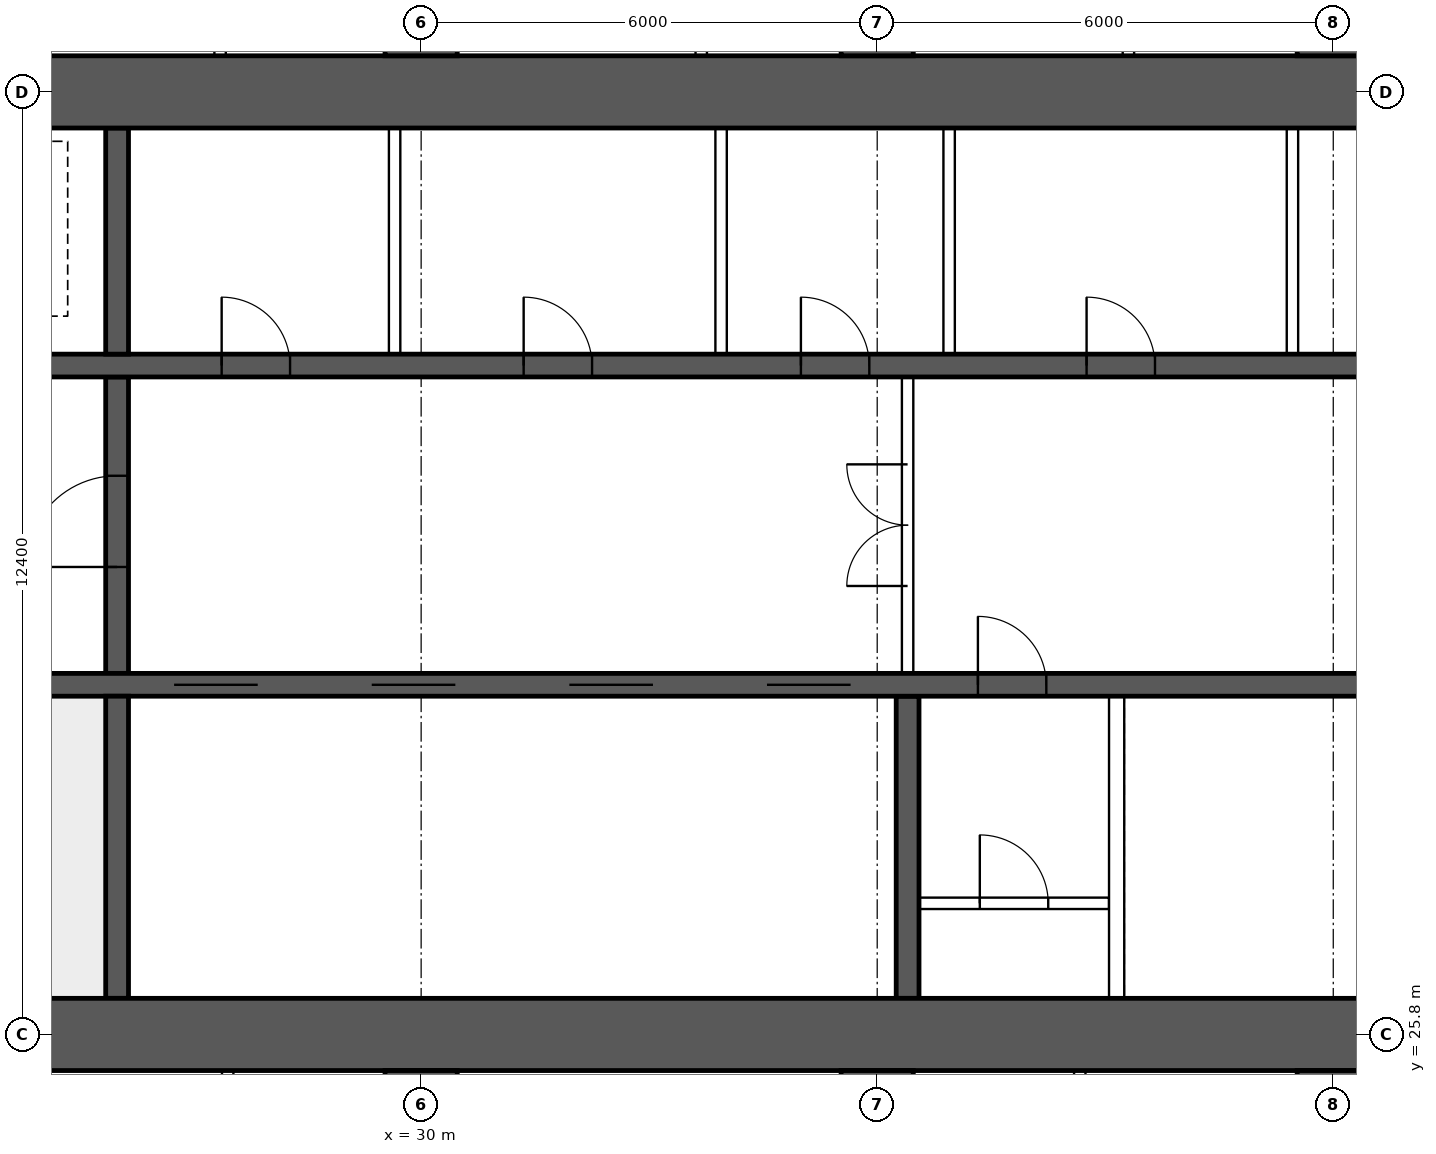
"""IFC4 building model, lengths in metres.
Left out: names, types, materials, properties, quantities, classifications, styles, units other than length and angle.
Written with IfcOpenShell. Run it as: python <this file> out.ifc"""

import sys

from ifc_helpers import new_model, si_unit, direction, frame, frame_2d, origin, place, context, subcontext, project, spatial, rectangle, extrude, element, fill, save


model = new_model("IFC4")
c1 = context("Model", 3, precision=1e-05, world=origin(), true_north=direction((0.0, 1.0)))
c2 = subcontext(c1, "Body", "Model", "MODEL_VIEW")
j1 = project(units=[si_unit("LENGTHUNIT", "METRE"), si_unit("PLANEANGLEUNIT", "RADIAN")], contexts=[c1])
p1 = place(None, origin())
s1 = spatial("IfcSite", under=j1, at=p1, CompositionType="ELEMENT")
p2 = place(p1, origin())
s2 = spatial("IfcBuilding", under=s1, at=p2, CompositionType="ELEMENT")
p3 = place(p2, frame((0.0, 0.0, 114.4)))
s3 = spatial("IfcBuildingStorey", under=s2, at=p3, CompositionType="ELEMENT", Elevation=114.4)
for number, where, z_axis, x_axis in (
    (1, (18.0, 25.8, 0.0), (0.0, 0.0, 1.0), (1.0, 0.0, 0.0)),
    (2, (18.0, 38.2, 0.0), (0.0, 0.0, 1.0), (1.0, 0.0, 0.0)),
):
    element("IfcWall", number, at=place(p3, frame(where, z_axis=z_axis, x_axis=x_axis)), inside=s3, PredefinedType="SHEAR", context=c2, shape_type="SweptSolid", body=[
        extrude(rectangle(XDim=48.0, YDim=0.95, at=frame_2d((24.0, 0.0))), origin(), (0.0, 0.0, 1.0), 3.75),
    ])
p4 = place(p3, frame((18.475, 30.4, 0.0), z_axis=(0.0, 0.0, 1.0), x_axis=(1.0, 0.0, 0.0)))
e3 = element("IfcWall", 3, at=p4, inside=s3, PredefinedType="SHEAR", context=c2, shape_type="SweptSolid", body=[
    extrude(rectangle(XDim=47.05, YDim=0.3, at=frame_2d((23.525, 0.0))), origin(), (0.0, 0.0, 1.0), 3.75),
])
p5 = place(p4, frame((0.4, 0.0, 0.0)))
e4 = element("IfcOpeningElement", 4, at=p5, cuts=e3, PredefinedType="OPENING", context=c2, shape_type="SweptSolid", body=[
    extrude(rectangle(XDim=1.0, YDim=2.1, at=frame_2d((0.5, 1.05))), frame((0.0, 0.16, 0.0), z_axis=(0.0, -1.0, 0.0), x_axis=(1.0, 0.0, 0.0)), (0.0, 0.0, 1.0), 0.32),
])
p6 = place(p4, frame((45.65, 0.0, 0.0)))
e5 = element("IfcOpeningElement", 5, at=p6, cuts=e3, PredefinedType="OPENING", context=c2, shape_type="SweptSolid", body=[
    extrude(rectangle(XDim=1.0, YDim=2.1, at=frame_2d((0.5, 1.05))), frame((0.0, 0.16, 0.0), z_axis=(0.0, -1.0, 0.0), x_axis=(1.0, 0.0, 0.0)), (0.0, 0.0, 1.0), 0.32),
])
p7 = place(p4, frame((8.275, 0.0, 0.0)))
e6 = element("IfcOpeningElement", 6, at=p7, cuts=e3, PredefinedType="OPENING", context=c2, shape_type="SweptSolid", body=[
    extrude(rectangle(XDim=1.1, YDim=2.1, at=frame_2d((0.55, 1.05))), frame((0.0, 0.16, 0.0), z_axis=(0.0, -1.0, 0.0), x_axis=(1.0, 0.0, 0.0)), (0.0, 0.0, 1.0), 0.32),
])
p8 = place(p4, frame((10.875, 0.0, 0.0)))
e7 = element("IfcOpeningElement", 7, at=p8, cuts=e3, PredefinedType="OPENING", context=c2, shape_type="SweptSolid", body=[
    extrude(rectangle(XDim=1.1, YDim=2.1, at=frame_2d((0.55, 1.05))), frame((0.0, 0.16, 0.0), z_axis=(0.0, -1.0, 0.0), x_axis=(1.0, 0.0, 0.0)), (0.0, 0.0, 1.0), 0.32),
])
p9 = place(p4, frame((13.475, 0.0, 0.0)))
e8 = element("IfcOpeningElement", 8, at=p9, cuts=e3, PredefinedType="OPENING", context=c2, shape_type="SweptSolid", body=[
    extrude(rectangle(XDim=1.1, YDim=2.1, at=frame_2d((0.55, 1.05))), frame((0.0, 0.16, 0.0), z_axis=(0.0, -1.0, 0.0), x_axis=(1.0, 0.0, 0.0)), (0.0, 0.0, 1.0), 0.32),
])
p10 = place(p4, frame((16.075, 0.0, 0.0)))
e9 = element("IfcOpeningElement", 9, at=p10, cuts=e3, PredefinedType="OPENING", context=c2, shape_type="SweptSolid", body=[
    extrude(rectangle(XDim=1.1, YDim=2.1, at=frame_2d((0.55, 1.05))), frame((0.0, 0.16, 0.0), z_axis=(0.0, -1.0, 0.0), x_axis=(1.0, 0.0, 0.0)), (0.0, 0.0, 1.0), 0.32),
])
p11 = place(p4, frame((18.85, 0.0, 0.0)))
e10 = element("IfcOpeningElement", 10, at=p11, cuts=e3, PredefinedType="OPENING", context=c2, shape_type="SweptSolid", body=[
    extrude(rectangle(XDim=0.9, YDim=2.1, at=frame_2d((0.45, 1.05))), frame((0.0, 0.16, 0.0), z_axis=(0.0, -1.0, 0.0), x_axis=(1.0, 0.0, 0.0)), (0.0, 0.0, 1.0), 0.32),
])
p12 = place(p4, frame((30.142, 0.0, 0.0)))
e11 = element("IfcOpeningElement", 11, at=p12, cuts=e3, PredefinedType="OPENING", context=c2, shape_type="SweptSolid", body=[
    extrude(rectangle(XDim=1.1, YDim=2.1, at=frame_2d((0.55, 1.05))), frame((0.0, 0.16, 0.0), z_axis=(0.0, -1.0, 0.0), x_axis=(1.0, 0.0, 0.0)), (0.0, 0.0, 1.0), 0.32),
])
p13 = place(p4, frame((33.675, 0.0, 0.0)))
e12 = element("IfcOpeningElement", 12, at=p13, cuts=e3, PredefinedType="OPENING", context=c2, shape_type="SweptSolid", body=[
    extrude(rectangle(XDim=1.1, YDim=2.1, at=frame_2d((0.55, 1.05))), frame((0.0, 0.16, 0.0), z_axis=(0.0, -1.0, 0.0), x_axis=(1.0, 0.0, 0.0)), (0.0, 0.0, 1.0), 0.32),
])
p14 = place(p4, frame((37.208, 0.0, 0.0)))
e13 = element("IfcOpeningElement", 13, at=p14, cuts=e3, PredefinedType="OPENING", context=c2, shape_type="SweptSolid", body=[
    extrude(rectangle(XDim=1.1, YDim=2.1, at=frame_2d((0.55, 1.05))), frame((0.0, 0.16, 0.0), z_axis=(0.0, -1.0, 0.0), x_axis=(1.0, 0.0, 0.0)), (0.0, 0.0, 1.0), 0.32),
])
p15 = place(p3, frame((18.475, 34.6, 0.0), z_axis=(0.0, 0.0, 1.0), x_axis=(1.0, 0.0, 0.0)))
e14 = element("IfcWall", 14, at=p15, inside=s3, PredefinedType="SHEAR", context=c2, shape_type="SweptSolid", body=[
    extrude(rectangle(XDim=47.05, YDim=0.3, at=frame_2d((23.525, 0.0))), origin(), (0.0, 0.0, 1.0), 3.75),
])
p16 = place(p15, frame((0.9, 0.0, 0.0)))
e15 = element("IfcOpeningElement", 15, at=p16, cuts=e14, PredefinedType="OPENING", context=c2, shape_type="SweptSolid", body=[
    extrude(rectangle(XDim=1.1, YDim=2.1, at=frame_2d((0.55, 1.05))), frame((0.0, 0.16, 0.0), z_axis=(0.0, -1.0, 0.0), x_axis=(1.0, 0.0, 0.0)), (0.0, 0.0, 1.0), 0.32),
])
p17 = place(p15, frame((45.05, 0.0, 0.0)))
e16 = element("IfcOpeningElement", 16, at=p17, cuts=e14, PredefinedType="OPENING", context=c2, shape_type="SweptSolid", body=[
    extrude(rectangle(XDim=1.1, YDim=2.1, at=frame_2d((0.55, 1.05))), frame((0.0, 0.16, 0.0), z_axis=(0.0, -1.0, 0.0), x_axis=(1.0, 0.0, 0.0)), (0.0, 0.0, 1.0), 0.32),
])
p18 = place(p15, frame((4.125, 0.0, 0.0)))
e17 = element("IfcOpeningElement", 17, at=p18, cuts=e14, PredefinedType="OPENING", context=c2, shape_type="SweptSolid", body=[
    extrude(rectangle(XDim=0.9, YDim=2.1, at=frame_2d((0.45, 1.05))), frame((0.0, 0.16, 0.0), z_axis=(0.0, -1.0, 0.0), x_axis=(1.0, 0.0, 0.0)), (0.0, 0.0, 1.0), 0.32),
])
p19 = place(p15, frame((42.025, 0.0, 0.0)))
e18 = element("IfcOpeningElement", 18, at=p19, cuts=e14, PredefinedType="OPENING", context=c2, shape_type="SweptSolid", body=[
    extrude(rectangle(XDim=0.9, YDim=2.1, at=frame_2d((0.45, 1.05))), frame((0.0, 0.16, 0.0), z_axis=(0.0, -1.0, 0.0), x_axis=(1.0, 0.0, 0.0)), (0.0, 0.0, 1.0), 0.32),
])
p20 = place(p15, frame((8.9, 0.0, 0.0)))
e19 = element("IfcOpeningElement", 19, at=p20, cuts=e14, PredefinedType="OPENING", context=c2, shape_type="SweptSolid", body=[
    extrude(rectangle(XDim=0.9, YDim=2.1, at=frame_2d((0.45, 1.05))), frame((0.0, 0.16, 0.0), z_axis=(0.0, -1.0, 0.0), x_axis=(1.0, 0.0, 0.0)), (0.0, 0.0, 1.0), 0.32),
])
p21 = place(p15, frame((12.874, 0.0, 0.0)))
e20 = element("IfcOpeningElement", 20, at=p21, cuts=e14, PredefinedType="OPENING", context=c2, shape_type="SweptSolid", body=[
    extrude(rectangle(XDim=0.9, YDim=2.1, at=frame_2d((0.45, 1.05))), frame((0.0, 0.16, 0.0), z_axis=(0.0, -1.0, 0.0), x_axis=(1.0, 0.0, 0.0)), (0.0, 0.0, 1.0), 0.32),
])
p22 = place(p15, frame((16.521, 0.0, 0.0)))
e21 = element("IfcOpeningElement", 21, at=p22, cuts=e14, PredefinedType="OPENING", context=c2, shape_type="SweptSolid", body=[
    extrude(rectangle(XDim=0.9, YDim=2.1, at=frame_2d((0.45, 1.05))), frame((0.0, 0.16, 0.0), z_axis=(0.0, -1.0, 0.0), x_axis=(1.0, 0.0, 0.0)), (0.0, 0.0, 1.0), 0.32),
])
p23 = place(p15, frame((20.28, 0.0, 0.0)))
e22 = element("IfcOpeningElement", 22, at=p23, cuts=e14, PredefinedType="OPENING", context=c2, shape_type="SweptSolid", body=[
    extrude(rectangle(XDim=0.9, YDim=2.1, at=frame_2d((0.45, 1.05))), frame((0.0, 0.16, 0.0), z_axis=(0.0, -1.0, 0.0), x_axis=(1.0, 0.0, 0.0)), (0.0, 0.0, 1.0), 0.32),
])
p24 = place(p15, frame((24.686, 0.0, 0.0)))
e23 = element("IfcOpeningElement", 23, at=p24, cuts=e14, PredefinedType="OPENING", context=c2, shape_type="SweptSolid", body=[
    extrude(rectangle(XDim=0.9, YDim=2.1, at=frame_2d((0.45, 1.05))), frame((0.0, 0.16, 0.0), z_axis=(0.0, -1.0, 0.0), x_axis=(1.0, 0.0, 0.0)), (0.0, 0.0, 1.0), 0.32),
])
p25 = place(p15, frame((27.483, 0.0, 0.0)))
e24 = element("IfcOpeningElement", 24, at=p25, cuts=e14, PredefinedType="OPENING", context=c2, shape_type="SweptSolid", body=[
    extrude(rectangle(XDim=0.9, YDim=2.1, at=frame_2d((0.45, 1.05))), frame((0.0, 0.16, 0.0), z_axis=(0.0, -1.0, 0.0), x_axis=(1.0, 0.0, 0.0)), (0.0, 0.0, 1.0), 0.32),
])
p26 = place(p15, frame((29.856, 0.0, 0.0)))
e25 = element("IfcOpeningElement", 25, at=p26, cuts=e14, PredefinedType="OPENING", context=c2, shape_type="SweptSolid", body=[
    extrude(rectangle(XDim=0.9, YDim=2.1, at=frame_2d((0.45, 1.05))), frame((0.0, 0.16, 0.0), z_axis=(0.0, -1.0, 0.0), x_axis=(1.0, 0.0, 0.0)), (0.0, 0.0, 1.0), 0.32),
])
p27 = place(p15, frame((33.706, 0.0, 0.0)))
e26 = element("IfcOpeningElement", 26, at=p27, cuts=e14, PredefinedType="OPENING", context=c2, shape_type="SweptSolid", body=[
    extrude(rectangle(XDim=0.9, YDim=2.1, at=frame_2d((0.45, 1.05))), frame((0.0, 0.16, 0.0), z_axis=(0.0, -1.0, 0.0), x_axis=(1.0, 0.0, 0.0)), (0.0, 0.0, 1.0), 0.32),
])
p28 = place(p15, frame((37.454, 0.0, 0.0)))
e27 = element("IfcOpeningElement", 27, at=p28, cuts=e14, PredefinedType="OPENING", context=c2, shape_type="SweptSolid", body=[
    extrude(rectangle(XDim=0.9, YDim=2.1, at=frame_2d((0.45, 1.05))), frame((0.0, 0.16, 0.0), z_axis=(0.0, -1.0, 0.0), x_axis=(1.0, 0.0, 0.0)), (0.0, 0.0, 1.0), 0.32),
])
p29 = place(p3, frame((26.0, 26.275, 0.0), z_axis=(0.0, 0.0, 1.0), x_axis=(0.0, 1.0, 0.0)))
e28 = element("IfcWall", 28, at=p29, inside=s3, PredefinedType="SHEAR", context=c2, shape_type="SweptSolid", body=[
    extrude(rectangle(XDim=3.975, YDim=0.3, at=frame_2d((1.988, 0.0))), origin(), (0.0, 0.0, 1.0), 3.75),
])
p30 = place(p3, frame((26.0, 30.55, 0.0), z_axis=(0.0, 0.0, 1.0), x_axis=(0.0, 1.0, 0.0)))
e29 = element("IfcWall", 29, at=p30, inside=s3, PredefinedType="SHEAR", context=c2, shape_type="SweptSolid", body=[
    extrude(rectangle(XDim=3.9, YDim=0.3, at=frame_2d((1.95, 0.0))), origin(), (0.0, 0.0, 1.0), 3.75),
])
p31 = place(p30, frame((1.4, 0.0, 0.0)))
e30 = element("IfcOpeningElement", 30, at=p31, cuts=e29, PredefinedType="OPENING", context=c2, shape_type="SweptSolid", body=[
    extrude(rectangle(XDim=1.2, YDim=2.1, at=frame_2d((0.6, 1.05))), frame((0.0, 0.16, 0.0), z_axis=(0.0, -1.0, 0.0), x_axis=(1.0, 0.0, 0.0)), (0.0, 0.0, 1.0), 0.32),
])
p32 = place(p3, frame((26.0, 34.75, 0.0), z_axis=(0.0, 0.0, 1.0), x_axis=(0.0, 1.0, 0.0)))
e31 = element("IfcWall", 31, at=p32, inside=s3, PredefinedType="SHEAR", context=c2, shape_type="SweptSolid", body=[
    extrude(rectangle(XDim=2.975, YDim=0.3, at=frame_2d((1.488, 0.0))), origin(), (0.0, 0.0, 1.0), 3.75),
])
p33 = place(p3, frame((36.4, 26.275, 0.0), z_axis=(0.0, 0.0, 1.0), x_axis=(0.0, 1.0, 0.0)))
e32 = element("IfcWall", 32, at=p33, inside=s3, PredefinedType="SHEAR", context=c2, shape_type="SweptSolid", body=[
    extrude(rectangle(XDim=3.975, YDim=0.3, at=frame_2d((1.988, 0.0))), origin(), (0.0, 0.0, 1.0), 3.75),
])
for number, where, z_axis, x_axis in (
    (33, (30.0, 16.0, 0.0), (0.0, 0.0, 1.0), (0.0, 1.0, 0.0)),
    (34, (30.0, 38.675, 0.0), (0.0, 0.0, 1.0), (0.0, 1.0, 0.0)),
    (35, (36.0, 16.0, 0.0), (0.0, 0.0, 1.0), (0.0, 1.0, 0.0)),
    (36, (36.0, 38.675, 0.0), (0.0, 0.0, 1.0), (0.0, 1.0, 0.0)),
    (37, (42.0, 16.0, 0.0), (0.0, 0.0, 1.0), (0.0, 1.0, 0.0)),
    (38, (42.0, 38.675, 0.0), (0.0, 0.0, 1.0), (0.0, 1.0, 0.0)),
):
    element("IfcWall", number, at=place(p3, frame(where, z_axis=z_axis, x_axis=x_axis)), inside=s3, PredefinedType="SHEAR", context=c2, shape_type="SweptSolid", body=[
        extrude(rectangle(XDim=9.325, YDim=0.95, at=frame_2d((4.663, 0.0))), origin(), (0.0, 0.0, 1.0), 3.75),
    ])
p34 = place(p3, frame((36.4, 30.55, 0.0), z_axis=(0.0, 0.0, 1.0), x_axis=(0.0, 1.0, 0.0)))
e39 = element("IfcWall", 39, at=p34, inside=s3, PredefinedType="SOLIDWALL", context=c2, shape_type="SweptSolid", body=[
    extrude(rectangle(XDim=3.9, YDim=0.15, at=frame_2d((1.95, 0.0))), origin(), (0.0, 0.0, 1.0), 3.5),
])
p35 = place(p34, frame((1.15, 0.0, 0.0)))
e40 = element("IfcOpeningElement", 40, at=p35, cuts=e39, PredefinedType="OPENING", context=c2, shape_type="SweptSolid", body=[
    extrude(rectangle(XDim=1.6, YDim=2.1, at=frame_2d((0.8, 1.05))), frame((0.0, 0.085, 0.0), z_axis=(0.0, -1.0, 0.0), x_axis=(1.0, 0.0, 0.0)), (0.0, 0.0, 1.0), 0.17),
])
for number, where, z_axis, x_axis in (
    (41, (29.651, 34.75, 0.0), (0.0, 0.0, 1.0), (0.0, 1.0, 0.0)),
    (42, (33.946, 34.75, 0.0), (0.0, 0.0, 1.0), (0.0, 1.0, 0.0)),
    (43, (36.946, 34.75, 0.0), (0.0, 0.0, 1.0), (0.0, 1.0, 0.0)),
    (44, (41.463, 34.75, 0.0), (0.0, 0.0, 1.0), (0.0, 1.0, 0.0)),
):
    element("IfcWall", number, at=place(p3, frame(where, z_axis=z_axis, x_axis=x_axis)), inside=s3, PredefinedType="SOLIDWALL", context=c2, shape_type="SweptSolid", body=[
        extrude(rectangle(XDim=2.975, YDim=0.15, at=frame_2d((1.488, 0.0))), origin(), (0.0, 0.0, 1.0), 3.5),
    ])
p36 = place(p3, frame((36.55, 27.525, 0.0), z_axis=(0.0, 0.0, 1.0), x_axis=(1.0, 0.0, 0.0)))
e45 = element("IfcWall", 45, at=p36, inside=s3, PredefinedType="SOLIDWALL", context=c2, shape_type="SweptSolid", body=[
    extrude(rectangle(XDim=2.5, YDim=0.15, at=frame_2d((1.25, 0.0))), origin(), (0.0, 0.0, 1.0), 3.5),
])
p37 = place(p36, frame((0.8, 0.0, 0.0)))
e46 = element("IfcOpeningElement", 46, at=p37, cuts=e45, PredefinedType="OPENING", context=c2, shape_type="SweptSolid", body=[
    extrude(rectangle(XDim=0.9, YDim=2.1, at=frame_2d((0.45, 1.05))), frame((0.0, 0.085, 0.0), z_axis=(0.0, -1.0, 0.0), x_axis=(1.0, 0.0, 0.0)), (0.0, 0.0, 1.0), 0.17),
])
p38 = place(p3, frame((39.15, 26.275, 0.0), z_axis=(0.0, 0.0, 1.0), x_axis=(0.0, 1.0, 0.0)))
e47 = element("IfcWall", 47, at=p38, inside=s3, PredefinedType="SOLIDWALL", context=c2, shape_type="SweptSolid", body=[
    extrude(rectangle(XDim=3.975, YDim=0.2, at=frame_2d((1.988, 0.0))), origin(), (0.0, 0.0, 1.0), 3.5),
])
for number, where, z_axis, x_axis in (
    (48, (27.455, 16.1, 0.0), (0.0, 0.0, 1.0), (0.0, 1.0, 0.0)),
    (49, (38.665, 16.1, 0.0), (0.0, 0.0, 1.0), (0.0, 1.0, 0.0)),
    (50, (27.355, 38.675, 0.0), (0.0, 0.0, 1.0), (0.0, 1.0, 0.0)),
    (51, (33.685, 38.675, 0.0), (0.0, 0.0, 1.0), (0.0, 1.0, 0.0)),
    (52, (39.305, 38.675, 0.0), (0.0, 0.0, 1.0), (0.0, 1.0, 0.0)),
):
    element("IfcWall", number, at=place(p3, frame(where, z_axis=z_axis, x_axis=x_axis)), inside=s3, PredefinedType="PARTITIONING", context=c2, shape_type="SweptSolid", body=[
        extrude(rectangle(XDim=9.225, YDim=0.15, at=frame_2d((4.612, 0.0))), origin(), (0.0, 0.0, 1.0), 3.5),
    ])
p39 = place(p35, origin())
e53 = element("IfcDoor", 53, at=p39, inside=s3, OperationType="DOUBLE_DOOR_SINGLE_SWING", PredefinedType="DOOR", context=c2, shape_type="SweptSolid", body=[
    extrude(rectangle(XDim=1.6, YDim=2.1, at=frame_2d((0.8, 1.05))), frame((0.0, 0.025, 0.0), z_axis=(0.0, -1.0, 0.0), x_axis=(1.0, 0.0, 0.0)), (0.0, 0.0, 1.0), 0.05),
])
fill(e40, e53)
p40 = place(p31, origin())
e54 = element("IfcDoor", 54, at=p40, inside=s3, OperationType="SINGLE_SWING_LEFT", PredefinedType="DOOR", context=c2, shape_type="SweptSolid", body=[
    extrude(rectangle(XDim=1.2, YDim=2.1, at=frame_2d((0.6, 1.05))), frame((0.0, 0.025, 0.0), z_axis=(0.0, -1.0, 0.0), x_axis=(1.0, 0.0, 0.0)), (0.0, 0.0, 1.0), 0.05),
])
fill(e30, e54)
p41 = place(p20, origin())
e55 = element("IfcDoor", 55, at=p41, inside=s3, OperationType="SINGLE_SWING_LEFT", PredefinedType="DOOR", context=c2, shape_type="SweptSolid", body=[
    extrude(rectangle(XDim=0.9, YDim=2.1, at=frame_2d((0.45, 1.05))), frame((0.0, 0.025, 0.0), z_axis=(0.0, -1.0, 0.0), x_axis=(1.0, 0.0, 0.0)), (0.0, 0.0, 1.0), 0.05),
])
fill(e19, e55)
p42 = place(p21, origin())
e56 = element("IfcDoor", 56, at=p42, inside=s3, OperationType="SINGLE_SWING_LEFT", PredefinedType="DOOR", context=c2, shape_type="SweptSolid", body=[
    extrude(rectangle(XDim=0.9, YDim=2.1, at=frame_2d((0.45, 1.05))), frame((0.0, 0.025, 0.0), z_axis=(0.0, -1.0, 0.0), x_axis=(1.0, 0.0, 0.0)), (0.0, 0.0, 1.0), 0.05),
])
fill(e20, e56)
p43 = place(p22, origin())
e57 = element("IfcDoor", 57, at=p43, inside=s3, OperationType="SINGLE_SWING_LEFT", PredefinedType="DOOR", context=c2, shape_type="SweptSolid", body=[
    extrude(rectangle(XDim=0.9, YDim=2.1, at=frame_2d((0.45, 1.05))), frame((0.0, 0.025, 0.0), z_axis=(0.0, -1.0, 0.0), x_axis=(1.0, 0.0, 0.0)), (0.0, 0.0, 1.0), 0.05),
])
fill(e21, e57)
p44 = place(p23, origin())
e58 = element("IfcDoor", 58, at=p44, inside=s3, OperationType="SINGLE_SWING_LEFT", PredefinedType="DOOR", context=c2, shape_type="SweptSolid", body=[
    extrude(rectangle(XDim=0.9, YDim=2.1, at=frame_2d((0.45, 1.05))), frame((0.0, 0.025, 0.0), z_axis=(0.0, -1.0, 0.0), x_axis=(1.0, 0.0, 0.0)), (0.0, 0.0, 1.0), 0.05),
])
fill(e22, e58)
p45 = place(p7, origin())
e59 = element("IfcDoor", 59, at=p45, inside=s3, OperationType="DOUBLE_DOOR_SLIDING", PredefinedType="DOOR", context=c2, shape_type="SweptSolid", body=[
    extrude(rectangle(XDim=1.1, YDim=2.1, at=frame_2d((0.55, 1.05))), frame((0.0, 0.025, 0.0), z_axis=(0.0, -1.0, 0.0), x_axis=(1.0, 0.0, 0.0)), (0.0, 0.0, 1.0), 0.05),
])
fill(e6, e59)
p46 = place(p8, origin())
e60 = element("IfcDoor", 60, at=p46, inside=s3, OperationType="DOUBLE_DOOR_SLIDING", PredefinedType="DOOR", context=c2, shape_type="SweptSolid", body=[
    extrude(rectangle(XDim=1.1, YDim=2.1, at=frame_2d((0.55, 1.05))), frame((0.0, 0.025, 0.0), z_axis=(0.0, -1.0, 0.0), x_axis=(1.0, 0.0, 0.0)), (0.0, 0.0, 1.0), 0.05),
])
fill(e7, e60)
p47 = place(p9, origin())
e61 = element("IfcDoor", 61, at=p47, inside=s3, OperationType="DOUBLE_DOOR_SLIDING", PredefinedType="DOOR", context=c2, shape_type="SweptSolid", body=[
    extrude(rectangle(XDim=1.1, YDim=2.1, at=frame_2d((0.55, 1.05))), frame((0.0, 0.025, 0.0), z_axis=(0.0, -1.0, 0.0), x_axis=(1.0, 0.0, 0.0)), (0.0, 0.0, 1.0), 0.05),
])
fill(e8, e61)
p48 = place(p10, origin())
e62 = element("IfcDoor", 62, at=p48, inside=s3, OperationType="DOUBLE_DOOR_SLIDING", PredefinedType="DOOR", context=c2, shape_type="SweptSolid", body=[
    extrude(rectangle(XDim=1.1, YDim=2.1, at=frame_2d((0.55, 1.05))), frame((0.0, 0.025, 0.0), z_axis=(0.0, -1.0, 0.0), x_axis=(1.0, 0.0, 0.0)), (0.0, 0.0, 1.0), 0.05),
])
fill(e9, e62)
p49 = place(p37, origin())
e63 = element("IfcDoor", 63, at=p49, inside=s3, OperationType="SINGLE_SWING_LEFT", PredefinedType="DOOR", context=c2, shape_type="SweptSolid", body=[
    extrude(rectangle(XDim=0.9, YDim=2.1, at=frame_2d((0.45, 1.05))), frame((0.0, 0.025, 0.0), z_axis=(0.0, -1.0, 0.0), x_axis=(1.0, 0.0, 0.0)), (0.0, 0.0, 1.0), 0.05),
])
fill(e46, e63)
p50 = place(p11, origin())
e64 = element("IfcDoor", 64, at=p50, inside=s3, OperationType="SINGLE_SWING_LEFT", PredefinedType="DOOR", context=c2, shape_type="SweptSolid", body=[
    extrude(rectangle(XDim=0.9, YDim=2.1, at=frame_2d((0.45, 1.05))), frame((0.0, 0.025, 0.0), z_axis=(0.0, -1.0, 0.0), x_axis=(1.0, 0.0, 0.0)), (0.0, 0.0, 1.0), 0.05),
])
fill(e10, e64)
save(model, sys.argv[1])
